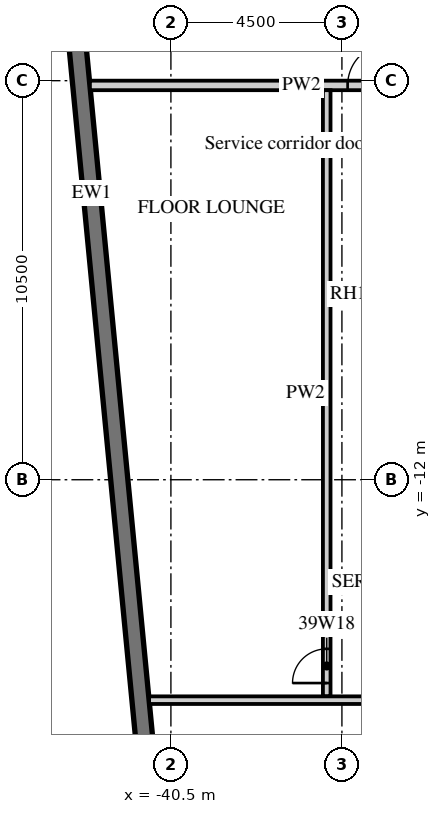
"""IFC4 building model, lengths in metres.
Left out: names, types, materials, properties, quantities, classifications, styles, units other than length and angle.
Written with IfcOpenShell. Run it as: python <this file> out.ifc"""

import sys

from ifc_helpers import new_model, si_unit, direction, frame, frame_2d, origin, place, context, subcontext, project, spatial, rectangle, extrude, element, fill, save


model = new_model("IFC4")
c1 = context("Model", 3, precision=1e-05, world=origin(), true_north=direction((0.0, 1.0)))
c2 = subcontext(c1, "Body", "Model", "MODEL_VIEW")
j1 = project(units=[si_unit("LENGTHUNIT", "METRE"), si_unit("PLANEANGLEUNIT", "RADIAN")], contexts=[c1])
p1 = place(None, origin())
s1 = spatial("IfcSite", under=j1, at=p1, CompositionType="ELEMENT")
p2 = place(p1, origin())
s2 = spatial("IfcBuilding", under=s1, at=p2, CompositionType="ELEMENT")
p3 = place(p2, frame((0.0, 0.0, 170.2)))
s3 = spatial("IfcBuildingStorey", under=s2, at=p3, CompositionType="ELEMENT", Elevation=170.2)
p4 = place(p3, frame((-44.214, 12.466, 0.0), z_axis=(0.0, 0.0, 1.0), x_axis=(0.095847314626, -0.995396047952, 0.0)))
e1 = element("IfcWall", 1, at=p4, inside=s3, PredefinedType="SOLIDWALL", context=c2, shape_type="SweptSolid", body=[
    extrude(rectangle(XDim=34.0, YDim=0.45, at=frame_2d((17.0, 0.0))), origin(), (0.0, 0.0, 1.0), 3.02),
])
p5 = place(p4, frame((2.865, 0.0, 0.45)))
e2 = element("IfcOpeningElement", 2, at=p5, cuts=e1, PredefinedType="OPENING", context=c2, shape_type="SweptSolid", body=[
    extrude(rectangle(XDim=3.3, YDim=2.25, at=frame_2d((1.65, 1.125))), frame((0.0, 0.235, 0.0), z_axis=(0.0, -1.0, 0.0), x_axis=(1.0, 0.0, 0.0)), (0.0, 0.0, 1.0), 0.47),
])
p6 = place(p4, frame((7.386, 0.0, 0.45)))
e3 = element("IfcOpeningElement", 3, at=p6, cuts=e1, PredefinedType="OPENING", context=c2, shape_type="SweptSolid", body=[
    extrude(rectangle(XDim=3.3, YDim=2.25, at=frame_2d((1.65, 1.125))), frame((0.0, 0.235, 0.0), z_axis=(0.0, -1.0, 0.0), x_axis=(1.0, 0.0, 0.0)), (0.0, 0.0, 1.0), 0.47),
])
p7 = place(p3, frame((-42.632, -1.625, 0.0), z_axis=(0.0, 0.0, 1.0), x_axis=(1.0, 0.0, 0.0)))
e4 = element("IfcWall", 4, at=p7, inside=s3, PredefinedType="PARTITIONING", context=c2, shape_type="SweptSolid", body=[
    extrude(rectangle(XDim=11.132, YDim=0.25, at=frame_2d((5.566, 0.0))), origin(), (0.0, 0.0, 1.0), 3.02),
])
p8 = place(p7, frame((9.207, 0.0, 0.0)))
e5 = element("IfcOpeningElement", 5, at=p8, cuts=e4, PredefinedType="OPENING", context=c2, shape_type="SweptSolid", body=[
    extrude(rectangle(XDim=1.3, YDim=2.1, at=frame_2d((0.65, 1.05))), frame((0.0, 0.135, 0.0), z_axis=(0.0, -1.0, 0.0), x_axis=(1.0, 0.0, 0.0)), (0.0, 0.0, 1.0), 0.27),
])
p9 = place(p7, frame((6.781, 0.0, 0.0)))
e6 = element("IfcOpeningElement", 6, at=p9, cuts=e4, PredefinedType="OPENING", context=c2, shape_type="SweptSolid", body=[
    extrude(rectangle(XDim=1.1, YDim=2.1, at=frame_2d((0.55, 1.05))), frame((0.0, 0.135, 0.0), z_axis=(0.0, -1.0, 0.0), x_axis=(1.0, 0.0, 0.0)), (0.0, 0.0, 1.0), 0.27),
])
p10 = place(p3, frame((-36.4, -17.7, 0.0), z_axis=(0.0, 0.0, 1.0), x_axis=(0.0, 1.0, 0.0)))
e7 = element("IfcWall", 7, at=p10, inside=s3, PredefinedType="PARTITIONING", context=c2, shape_type="SweptSolid", body=[
    extrude(rectangle(XDim=15.95, YDim=0.2, at=frame_2d((7.975, 0.0))), origin(), (0.0, 0.0, 1.0), 3.02),
])
p11 = place(p10, frame((0.35, 0.0, 0.0)))
e8 = element("IfcOpeningElement", 8, at=p11, cuts=e7, PredefinedType="OPENING", context=c2, shape_type="SweptSolid", body=[
    extrude(rectangle(XDim=0.9, YDim=2.1, at=frame_2d((0.45, 1.05))), frame((0.0, 0.11, 0.0), z_axis=(0.0, -1.0, 0.0), x_axis=(1.0, 0.0, 0.0)), (0.0, 0.0, 1.0), 0.22),
])
p12 = place(p3, frame((-41.074, -17.8, 0.0), z_axis=(0.0, 0.0, 1.0), x_axis=(1.0, 0.0, 0.0)))
e9 = element("IfcWall", 9, at=p12, inside=s3, PredefinedType="PARTITIONING", context=c2, shape_type="SweptSolid", body=[
    extrude(rectangle(XDim=27.474, YDim=0.2, at=frame_2d((13.737, 0.0))), origin(), (0.0, 0.0, 1.0), 3.02),
])
p13 = place(p12, frame((11.562, 0.0, 0.0)))
e10 = element("IfcOpeningElement", 10, at=p13, cuts=e9, PredefinedType="OPENING", context=c2, shape_type="SweptSolid", body=[
    extrude(rectangle(XDim=0.9, YDim=2.1, at=frame_2d((0.45, 1.05))), frame((0.0, 0.11, 0.0), z_axis=(0.0, -1.0, 0.0), x_axis=(1.0, 0.0, 0.0)), (0.0, 0.0, 1.0), 0.22),
])
p14 = place(p12, frame((19.862, 0.0, 0.0)))
e11 = element("IfcOpeningElement", 11, at=p14, cuts=e9, PredefinedType="OPENING", context=c2, shape_type="SweptSolid", body=[
    extrude(rectangle(XDim=0.9, YDim=2.1, at=frame_2d((0.45, 1.05))), frame((0.0, 0.11, 0.0), z_axis=(0.0, -1.0, 0.0), x_axis=(1.0, 0.0, 0.0)), (0.0, 0.0, 1.0), 0.22),
])
p15 = place(p9, origin())
e12 = element("IfcDoor", 12, at=p15, inside=s3, OperationType="SINGLE_SWING_RIGHT", PredefinedType="DOOR", context=c2, shape_type="SweptSolid", body=[
    extrude(rectangle(XDim=1.1, YDim=2.1, at=frame_2d((0.55, 1.05))), frame((0.0, 0.025, 0.0), z_axis=(0.0, -1.0, 0.0), x_axis=(1.0, 0.0, 0.0)), (0.0, 0.0, 1.0), 0.05),
])
fill(e6, e12)
p16 = place(p11, origin())
e13 = element("IfcDoor", 13, at=p16, inside=s3, OperationType="SINGLE_SWING_LEFT", PredefinedType="DOOR", context=c2, shape_type="SweptSolid", body=[
    extrude(rectangle(XDim=0.9, YDim=2.1, at=frame_2d((0.45, 1.05))), frame((0.0, 0.025, 0.0), z_axis=(0.0, -1.0, 0.0), x_axis=(1.0, 0.0, 0.0)), (0.0, 0.0, 1.0), 0.05),
])
fill(e8, e13)
save(model, sys.argv[1])
